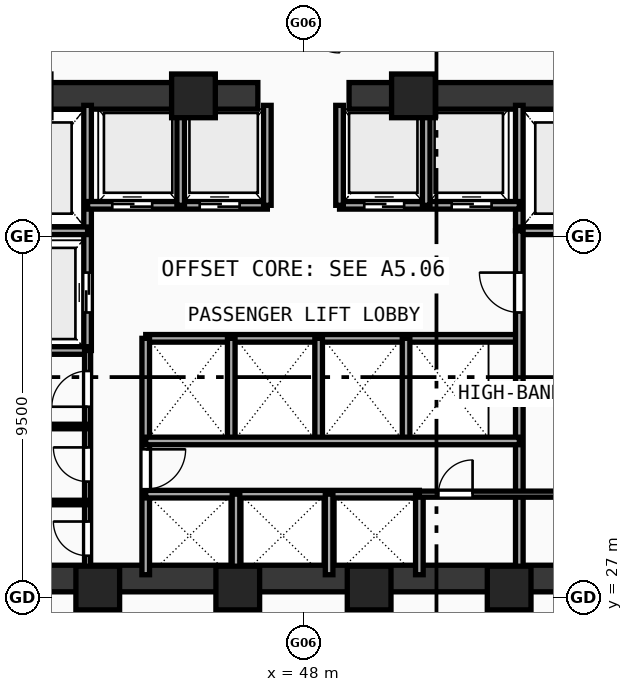
"""IFC4 building model, lengths in metres.
Left out: names, types, materials, properties, quantities, classifications, styles, units other than length and angle.
Written with IfcOpenShell. Run it as: python <this file> out.ifc"""

import sys

from ifc_helpers import new_model, si_unit, direction, frame, frame_2d, origin, origin_with_axes, origin_2d, place, context, subcontext, project, spatial, rectangle, hollow_rectangle, extrude, source, transform, mapped, element, fill, save


model = new_model("IFC4")
c1 = context("Model", 3, precision=1e-05, world=origin(), true_north=direction((0.0, 1.0)))
c2 = subcontext(c1, "Body", "Model", "MODEL_VIEW")
j1 = project(units=[si_unit("LENGTHUNIT", "METRE"), si_unit("PLANEANGLEUNIT", "RADIAN")], contexts=[c1])
p1 = place(None, origin())
s1 = spatial("IfcSite", under=j1, at=p1, CompositionType="ELEMENT")
p2 = place(p1, origin())
s2 = spatial("IfcBuilding", under=s1, at=p2, CompositionType="ELEMENT")
p3 = place(p2, frame((0.0, 0.0, 55.81)))
s3 = spatial("IfcBuildingStorey", under=s2, at=p3, CompositionType="ELEMENT", Elevation=55.81)
p4 = place(p3, frame((35.45, 27.5, 0.0), z_axis=(0.0, 0.0, 1.0), x_axis=(1.0, 0.0, 0.0)))
e1 = element("IfcWall", 1, at=p4, inside=s3, PredefinedType="SHEAR", context=c2, shape_type="SweptSolid", body=[
    extrude(rectangle(XDim=25.1, YDim=0.7, at=frame_2d((12.55, 0.0))), origin(), (0.0, 0.0, 1.0), 3.37),
])
p5 = place(p3, frame((35.45, 40.2, 0.0), z_axis=(0.0, 0.0, 1.0), x_axis=(1.0, 0.0, 0.0)))
e2 = element("IfcWall", 2, at=p5, inside=s3, PredefinedType="SHEAR", context=c2, shape_type="SweptSolid", body=[
    extrude(rectangle(XDim=11.35, YDim=0.7, at=frame_2d((5.675, 0.0))), origin(), (0.0, 0.0, 1.0), 3.37),
])
p6 = place(p5, frame((1.7, 0.0, 0.0)))
e3 = element("IfcOpeningElement", 3, at=p6, cuts=e2, PredefinedType="OPENING", context=c2, shape_type="SweptSolid", body=[
    extrude(rectangle(XDim=1.05, YDim=2.1, at=frame_2d((0.525, 1.05))), frame((0.0, 0.36, 0.0), z_axis=(0.0, -1.0, 0.0), x_axis=(1.0, 0.0, 0.0)), (0.0, 0.0, 1.0), 0.72),
])
p7 = place(p3, frame((49.2, 40.2, 0.0), z_axis=(0.0, 0.0, 1.0), x_axis=(1.0, 0.0, 0.0)))
e4 = element("IfcWall", 4, at=p7, inside=s3, PredefinedType="SHEAR", context=c2, shape_type="SweptSolid", body=[
    extrude(rectangle(XDim=11.35, YDim=0.7, at=frame_2d((5.675, 0.0))), origin(), (0.0, 0.0, 1.0), 3.37),
])
p8 = place(p7, frame((8.6, 0.0, 0.0)))
e5 = element("IfcOpeningElement", 5, at=p8, cuts=e4, PredefinedType="OPENING", context=c2, shape_type="SweptSolid", body=[
    extrude(rectangle(XDim=1.05, YDim=2.1, at=frame_2d((0.525, 1.05))), frame((0.0, 0.36, 0.0), z_axis=(0.0, -1.0, 0.0), x_axis=(1.0, 0.0, 0.0)), (0.0, 0.0, 1.0), 0.72),
])
m1 = source(origin(), c2, "Body", "SweptSolid", [
    extrude(hollow_rectangle(XDim=1.15, YDim=1.15, WallThickness=0.048, at=origin_2d()), origin(), (0.0, 0.0, 1.0), 3.63),
])
for number, where, z_axis, x_axis in (
    (6, (42.588, 27.25, -0.26), (0.0, 0.0, 1.0), (1.0, 0.0, 0.0)),
    (7, (46.272, 27.25, -0.26), (0.0, 0.0, 1.0), (1.0, 0.0, 0.0)),
    (8, (49.729, 27.25, -0.26), (0.0, 0.0, 1.0), (1.0, 0.0, 0.0)),
    (9, (53.412, 27.25, -0.26), (0.0, 0.0, 1.0), (1.0, 0.0, 0.0)),
    (10, (50.894, 40.2, -0.26), (0.0, 0.0, 1.0), (1.0, 0.0, 0.0)),
    (11, (45.106, 40.2, -0.26), (0.0, 0.0, 1.0), (1.0, 0.0, 0.0)),
):
    element("IfcColumn", number, at=place(p3, frame(where, z_axis=z_axis, x_axis=x_axis)), inside=s3, PredefinedType="COLUMN", context=c2, shape_type="MappedRepresentation", body=[
        mapped(m1, transform((0.0, 0.0, 0.0), scale=1.0)),
    ])
p9 = place(p3, frame((42.32, 33.5, 0.0), z_axis=(0.0, 0.0, 1.0), x_axis=(0.0, 1.0, 0.0)))
e12 = element("IfcWall", 12, at=p9, inside=s3, PredefinedType="SOLIDWALL", context=c2, shape_type="SweptSolid", body=[
    extrude(rectangle(XDim=6.45, YDim=0.2, at=frame_2d((3.225, 0.0))), origin(), (0.0, 0.0, 1.0), 3.37),
])
p10 = place(p9, frame((1.0, 0.0, 0.0)))
e13 = element("IfcOpeningElement", 13, at=p10, cuts=e12, PredefinedType="OPENING", context=c2, shape_type="SweptSolid", body=[
    extrude(rectangle(XDim=1.05, YDim=2.1, at=frame_2d((0.525, 1.05))), frame((0.0, 0.11, 0.0), z_axis=(0.0, -1.0, 0.0), x_axis=(1.0, 0.0, 0.0)), (0.0, 0.0, 1.0), 0.22),
])
for number, where, z_axis, x_axis in (
    (14, (39.6, 36.65, 0.0), (0.0, 0.0, 1.0), (1.0, 0.0, 0.0)),
    (15, (39.6, 33.5, 0.0), (0.0, 0.0, 1.0), (1.0, 0.0, 0.0)),
):
    element("IfcWall", number, at=place(p3, frame(where, z_axis=z_axis, x_axis=x_axis)), inside=s3, PredefinedType="SOLIDWALL", context=c2, shape_type="SweptSolid", body=[
        extrude(rectangle(XDim=2.72, YDim=0.2, at=frame_2d((1.36, 0.0))), origin(), (0.0, 0.0, 1.0), 3.37),
    ])
p11 = place(p3, frame((53.68, 36.65, 0.0), z_axis=(0.0, 0.0, 1.0), x_axis=(0.0, 1.0, 0.0)))
e16 = element("IfcWall", 16, at=p11, inside=s3, PredefinedType="SOLIDWALL", context=c2, shape_type="SweptSolid", body=[
    extrude(rectangle(XDim=3.3, YDim=0.2, at=frame_2d((1.65, 0.0))), origin(), (0.0, 0.0, 1.0), 3.37),
])
p12 = place(p3, frame((53.68, 36.65, 0.0), z_axis=(0.0, 0.0, 1.0), x_axis=(1.0, 0.0, 0.0)))
e17 = element("IfcWall", 17, at=p12, inside=s3, PredefinedType="SOLIDWALL", context=c2, shape_type="SweptSolid", body=[
    extrude(rectangle(XDim=2.72, YDim=0.2, at=frame_2d((1.36, 0.0))), origin(), (0.0, 0.0, 1.0), 3.37),
])
p13 = place(p3, frame((42.32, 37.32, 0.0), z_axis=(0.0, 0.0, 1.0), x_axis=(1.0, 0.0, 0.0)))
e18 = element("IfcWall", 18, at=p13, inside=s3, PredefinedType="SOLIDWALL", context=c2, shape_type="SweptSolid", body=[
    extrude(rectangle(XDim=4.73, YDim=0.2, at=frame_2d((2.365, 0.0))), origin(), (0.0, 0.0, 1.0), 3.37),
])
p14 = place(p13, frame((0.65, 0.0, 0.0)))
e19 = element("IfcOpeningElement", 19, at=p14, cuts=e18, PredefinedType="OPENING", context=c2, shape_type="SweptSolid", body=[
    extrude(rectangle(XDim=1.05, YDim=2.1, at=frame_2d((0.525, 1.05))), frame((0.0, 0.11, 0.0), z_axis=(0.0, -1.0, 0.0), x_axis=(1.0, 0.0, 0.0)), (0.0, 0.0, 1.0), 0.22),
])
p15 = place(p13, frame((2.95, 0.0, 0.0)))
e20 = element("IfcOpeningElement", 20, at=p15, cuts=e18, PredefinedType="OPENING", context=c2, shape_type="SweptSolid", body=[
    extrude(rectangle(XDim=1.05, YDim=2.1, at=frame_2d((0.525, 1.05))), frame((0.0, 0.11, 0.0), z_axis=(0.0, -1.0, 0.0), x_axis=(1.0, 0.0, 0.0)), (0.0, 0.0, 1.0), 0.22),
])
p16 = place(p3, frame((48.95, 37.32, 0.0), z_axis=(0.0, 0.0, 1.0), x_axis=(1.0, 0.0, 0.0)))
e21 = element("IfcWall", 21, at=p16, inside=s3, PredefinedType="SOLIDWALL", context=c2, shape_type="SweptSolid", body=[
    extrude(rectangle(XDim=4.73, YDim=0.2, at=frame_2d((2.365, 0.0))), origin(), (0.0, 0.0, 1.0), 3.37),
])
p17 = place(p16, frame((0.65, 0.0, 0.0)))
e22 = element("IfcOpeningElement", 22, at=p17, cuts=e21, PredefinedType="OPENING", context=c2, shape_type="SweptSolid", body=[
    extrude(rectangle(XDim=1.05, YDim=2.1, at=frame_2d((0.525, 1.05))), frame((0.0, 0.11, 0.0), z_axis=(0.0, -1.0, 0.0), x_axis=(1.0, 0.0, 0.0)), (0.0, 0.0, 1.0), 0.22),
])
p18 = place(p16, frame((2.95, 0.0, 0.0)))
e23 = element("IfcOpeningElement", 23, at=p18, cuts=e21, PredefinedType="OPENING", context=c2, shape_type="SweptSolid", body=[
    extrude(rectangle(XDim=1.05, YDim=2.1, at=frame_2d((0.525, 1.05))), frame((0.0, 0.11, 0.0), z_axis=(0.0, -1.0, 0.0), x_axis=(1.0, 0.0, 0.0)), (0.0, 0.0, 1.0), 0.22),
])
for number, where, z_axis, x_axis in (
    (24, (47.05, 37.32, 0.0), (0.0, 0.0, 1.0), (0.0, 1.0, 0.0)),
    (25, (48.95, 37.32, 0.0), (0.0, 0.0, 1.0), (0.0, 1.0, 0.0)),
    (26, (44.77, 37.32, 0.0), (0.0, 0.0, 1.0), (0.0, 1.0, 0.0)),
    (27, (51.23, 37.32, 0.0), (0.0, 0.0, 1.0), (0.0, 1.0, 0.0)),
):
    element("IfcWall", number, at=place(p3, frame(where, z_axis=z_axis, x_axis=x_axis)), inside=s3, PredefinedType="SOLIDWALL", context=c2, shape_type="SweptSolid", body=[
        extrude(rectangle(XDim=2.63, YDim=0.2, at=frame_2d((1.315, 0.0))), origin(), (0.0, 0.0, 1.0), 3.37),
    ])
p19 = place(p3, frame((43.85, 33.82, 0.0), z_axis=(0.0, 0.0, 1.0), x_axis=(1.0, 0.0, 0.0)))
e28 = element("IfcWall", 28, at=p19, inside=s3, PredefinedType="SOLIDWALL", context=c2, shape_type="SweptSolid", body=[
    extrude(rectangle(XDim=9.83, YDim=0.2, at=frame_2d((4.915, 0.0))), origin(), (0.0, 0.0, 1.0), 3.37),
])
p20 = place(p3, frame((43.85, 27.6, 0.0), z_axis=(0.0, 0.0, 1.0), x_axis=(0.0, 1.0, 0.0)))
e29 = element("IfcWall", 29, at=p20, inside=s3, PredefinedType="SOLIDWALL", context=c2, shape_type="SweptSolid", body=[
    extrude(rectangle(XDim=6.22, YDim=0.2, at=frame_2d((3.11, 0.0))), origin(), (0.0, 0.0, 1.0), 3.37),
])
p21 = place(p20, frame((2.25, 0.0, 0.0)))
e30 = element("IfcOpeningElement", 30, at=p21, cuts=e29, PredefinedType="OPENING", context=c2, shape_type="SweptSolid", body=[
    extrude(rectangle(XDim=1.05, YDim=2.1, at=frame_2d((0.525, 1.05))), frame((0.0, 0.11, 0.0), z_axis=(0.0, -1.0, 0.0), x_axis=(1.0, 0.0, 0.0)), (0.0, 0.0, 1.0), 0.22),
])
p22 = place(p3, frame((53.68, 27.6, 0.0), z_axis=(0.0, 0.0, 1.0), x_axis=(0.0, 1.0, 0.0)))
e31 = element("IfcWall", 31, at=p22, inside=s3, PredefinedType="SOLIDWALL", context=c2, shape_type="SweptSolid", body=[
    extrude(rectangle(XDim=9.05, YDim=0.2, at=frame_2d((4.525, 0.0))), origin(), (0.0, 0.0, 1.0), 3.37),
])
p23 = place(p22, frame((6.9, 0.0, 0.0)))
e32 = element("IfcOpeningElement", 32, at=p23, cuts=e31, PredefinedType="OPENING", context=c2, shape_type="SweptSolid", body=[
    extrude(rectangle(XDim=1.05, YDim=2.1, at=frame_2d((0.525, 1.05))), frame((0.0, 0.11, 0.0), z_axis=(0.0, -1.0, 0.0), x_axis=(1.0, 0.0, 0.0)), (0.0, 0.0, 1.0), 0.22),
])
for number, where, z_axis, x_axis in (
    (33, (46.1, 31.12, 0.0), (0.0, 0.0, 1.0), (0.0, 1.0, 0.0)),
    (34, (48.4, 31.12, 0.0), (0.0, 0.0, 1.0), (0.0, 1.0, 0.0)),
    (35, (50.7, 31.12, 0.0), (0.0, 0.0, 1.0), (0.0, 1.0, 0.0)),
):
    element("IfcWall", number, at=place(p3, frame(where, z_axis=z_axis, x_axis=x_axis)), inside=s3, PredefinedType="SOLIDWALL", context=c2, shape_type="SweptSolid", body=[
        extrude(rectangle(XDim=2.7, YDim=0.2, at=frame_2d((1.35, 0.0))), origin(), (0.0, 0.0, 1.0), 3.37),
    ])
p24 = place(p3, frame((43.85, 29.72, 0.0), z_axis=(0.0, 0.0, 1.0), x_axis=(1.0, 0.0, 0.0)))
e36 = element("IfcWall", 36, at=p24, inside=s3, PredefinedType="SOLIDWALL", context=c2, shape_type="SweptSolid", body=[
    extrude(rectangle(XDim=7.2, YDim=0.2, at=frame_2d((3.6, 0.0))), origin(), (0.0, 0.0, 1.0), 3.37),
])
p25 = place(p3, frame((51.05, 27.6, 0.0), z_axis=(0.0, 0.0, 1.0), x_axis=(0.0, 1.0, 0.0)))
e37 = element("IfcWall", 37, at=p25, inside=s3, PredefinedType="SOLIDWALL", context=c2, shape_type="SweptSolid", body=[
    extrude(rectangle(XDim=2.12, YDim=0.2, at=frame_2d((1.06, 0.0))), origin(), (0.0, 0.0, 1.0), 3.37),
])
p26 = place(p3, frame((43.85, 31.12, 0.0), z_axis=(0.0, 0.0, 1.0), x_axis=(1.0, 0.0, 0.0)))
e38 = element("IfcWall", 38, at=p26, inside=s3, PredefinedType="SOLIDWALL", context=c2, shape_type="SweptSolid", body=[
    extrude(rectangle(XDim=9.83, YDim=0.2, at=frame_2d((4.915, 0.0))), origin(), (0.0, 0.0, 1.0), 3.37),
])
for number, where, z_axis, x_axis in (
    (39, (46.225, 27.6, 0.0), (0.0, 0.0, 1.0), (0.0, 1.0, 0.0)),
    (40, (48.675, 27.6, 0.0), (0.0, 0.0, 1.0), (0.0, 1.0, 0.0)),
):
    element("IfcWall", number, at=place(p3, frame(where, z_axis=z_axis, x_axis=x_axis)), inside=s3, PredefinedType="SOLIDWALL", context=c2, shape_type="SweptSolid", body=[
        extrude(rectangle(XDim=2.12, YDim=0.2, at=frame_2d((1.06, 0.0))), origin(), (0.0, 0.0, 1.0), 3.37),
    ])
p27 = place(p3, frame((42.32, 27.6, 0.0), z_axis=(0.0, 0.0, 1.0), x_axis=(0.0, 1.0, 0.0)))
e41 = element("IfcWall", 41, at=p27, inside=s3, PredefinedType="PARTITIONING", context=c2, shape_type="SweptSolid", body=[
    extrude(rectangle(XDim=5.9, YDim=0.16, at=frame_2d((2.95, 0.0))), origin(), (0.0, 0.0, 1.0), 3.37),
])
p28 = place(p27, frame((0.5, 0.0, 0.0)))
e42 = element("IfcOpeningElement", 42, at=p28, cuts=e41, PredefinedType="OPENING", context=c2, shape_type="SweptSolid", body=[
    extrude(rectangle(XDim=0.9, YDim=2.1, at=frame_2d((0.45, 1.05))), frame((0.0, 0.09, 0.0), z_axis=(0.0, -1.0, 0.0), x_axis=(1.0, 0.0, 0.0)), (0.0, 0.0, 1.0), 0.18),
])
p29 = place(p27, frame((2.45, 0.0, 0.0)))
e43 = element("IfcOpeningElement", 43, at=p29, cuts=e41, PredefinedType="OPENING", context=c2, shape_type="SweptSolid", body=[
    extrude(rectangle(XDim=0.9, YDim=2.1, at=frame_2d((0.45, 1.05))), frame((0.0, 0.09, 0.0), z_axis=(0.0, -1.0, 0.0), x_axis=(1.0, 0.0, 0.0)), (0.0, 0.0, 1.0), 0.18),
])
p30 = place(p27, frame((4.42, 0.0, 0.0)))
e44 = element("IfcOpeningElement", 44, at=p30, cuts=e41, PredefinedType="OPENING", context=c2, shape_type="SweptSolid", body=[
    extrude(rectangle(XDim=0.94, YDim=2.1, at=frame_2d((0.47, 1.05))), frame((0.0, 0.09, 0.0), z_axis=(0.0, -1.0, 0.0), x_axis=(1.0, 0.0, 0.0)), (0.0, 0.0, 1.0), 0.18),
])
p31 = place(p3, frame((51.05, 29.72, 0.0), z_axis=(0.0, 0.0, 1.0), x_axis=(1.0, 0.0, 0.0)))
e45 = element("IfcWall", 45, at=p31, inside=s3, PredefinedType="PARTITIONING", context=c2, shape_type="SweptSolid", body=[
    extrude(rectangle(XDim=4.07, YDim=0.16, at=frame_2d((2.035, 0.0))), origin(), (0.0, 0.0, 1.0), 3.37),
])
p32 = place(p31, frame((0.5, 0.0, 0.0)))
e46 = element("IfcOpeningElement", 46, at=p32, cuts=e45, PredefinedType="OPENING", context=c2, shape_type="SweptSolid", body=[
    extrude(rectangle(XDim=0.9, YDim=2.1, at=frame_2d((0.45, 1.05))), frame((0.0, 0.09, 0.0), z_axis=(0.0, -1.0, 0.0), x_axis=(1.0, 0.0, 0.0)), (0.0, 0.0, 1.0), 0.18),
])
for number, where, z_axis, x_axis in (
    (47, (39.6, 29.5, 0.0), (0.0, 0.0, 1.0), (1.0, 0.0, 0.0)),
    (48, (39.6, 31.5, 0.0), (0.0, 0.0, 1.0), (1.0, 0.0, 0.0)),
):
    element("IfcWall", number, at=place(p3, frame(where, z_axis=z_axis, x_axis=x_axis)), inside=s3, PredefinedType="PARTITIONING", context=c2, shape_type="SweptSolid", body=[
        extrude(rectangle(XDim=2.72, YDim=0.12, at=frame_2d((1.36, 0.0))), origin(), (0.0, 0.0, 1.0), 3.37),
    ])
m2 = source(origin(), c2, "Body", "SweptSolid", [
    extrude(rectangle(XDim=1.05, YDim=2.1, at=frame_2d((0.525, 1.05))), frame((0.0, 0.025, 0.0), z_axis=(0.0, -1.0, 0.0), x_axis=(1.0, 0.0, 0.0)), (0.0, 0.0, 1.0), 0.05),
])
p33 = place(p10, origin_with_axes())
e49 = element("IfcDoor", 49, at=p33, inside=s3, OperationType="DOUBLE_DOOR_SLIDING", PredefinedType="DOOR", context=c2, shape_type="MappedRepresentation", body=[
    mapped(m2, transform((0.0, 0.0, 0.0), scale=1.0)),
])
fill(e13, e49)
p34 = place(p14, frame((1.05, 0.0, 0.0), z_axis=(0.0, 0.0, 1.0), x_axis=(-1.0, 0.0, 0.0)))
e50 = element("IfcDoor", 50, at=p34, inside=s3, OperationType="DOUBLE_DOOR_SLIDING", PredefinedType="DOOR", context=c2, shape_type="MappedRepresentation", body=[
    mapped(m2, transform((0.0, 0.0, 0.0), scale=1.0)),
])
fill(e19, e50)
p35 = place(p15, frame((1.05, 0.0, 0.0), z_axis=(0.0, 0.0, 1.0), x_axis=(-1.0, 0.0, 0.0)))
e51 = element("IfcDoor", 51, at=p35, inside=s3, OperationType="DOUBLE_DOOR_SLIDING", PredefinedType="DOOR", context=c2, shape_type="MappedRepresentation", body=[
    mapped(m2, transform((0.0, 0.0, 0.0), scale=1.0)),
])
fill(e20, e51)
p36 = place(p17, frame((1.05, 0.0, 0.0), z_axis=(0.0, 0.0, 1.0), x_axis=(-1.0, 0.0, 0.0)))
e52 = element("IfcDoor", 52, at=p36, inside=s3, OperationType="DOUBLE_DOOR_SLIDING", PredefinedType="DOOR", context=c2, shape_type="MappedRepresentation", body=[
    mapped(m2, transform((0.0, 0.0, 0.0), scale=1.0)),
])
fill(e22, e52)
p37 = place(p18, frame((1.05, 0.0, 0.0), z_axis=(0.0, 0.0, 1.0), x_axis=(-1.0, 0.0, 0.0)))
e53 = element("IfcDoor", 53, at=p37, inside=s3, OperationType="DOUBLE_DOOR_SLIDING", PredefinedType="DOOR", context=c2, shape_type="MappedRepresentation", body=[
    mapped(m2, transform((0.0, 0.0, 0.0), scale=1.0)),
])
fill(e23, e53)
p38 = place(p21, frame((1.05, 0.0, 0.0), z_axis=(0.0, 0.0, 1.0), x_axis=(-1.0, 0.0, 0.0)))
e54 = element("IfcDoor", 54, at=p38, inside=s3, OperationType="SINGLE_SWING_LEFT", PredefinedType="DOOR", context=c2, shape_type="MappedRepresentation", body=[
    mapped(m2, transform((0.0, 0.0, 0.0), scale=1.0)),
])
fill(e30, e54)
p39 = place(p23, origin_with_axes())
e55 = element("IfcDoor", 55, at=p39, inside=s3, OperationType="SINGLE_SWING_RIGHT", PredefinedType="DOOR", context=c2, shape_type="MappedRepresentation", body=[
    mapped(m2, transform((0.0, 0.0, 0.0), scale=1.0)),
])
fill(e32, e55)
m3 = source(origin(), c2, "Body", "SweptSolid", [
    extrude(rectangle(XDim=0.9, YDim=2.1, at=frame_2d((0.45, 1.05))), frame((0.0, 0.025, 0.0), z_axis=(0.0, -1.0, 0.0), x_axis=(1.0, 0.0, 0.0)), (0.0, 0.0, 1.0), 0.05),
])
p40 = place(p28, origin_with_axes())
e56 = element("IfcDoor", 56, at=p40, inside=s3, OperationType="SINGLE_SWING_RIGHT", PredefinedType="DOOR", context=c2, shape_type="MappedRepresentation", body=[
    mapped(m3, transform((0.0, 0.0, 0.0), scale=1.0)),
])
fill(e42, e56)
p41 = place(p29, origin_with_axes())
e57 = element("IfcDoor", 57, at=p41, inside=s3, OperationType="SINGLE_SWING_RIGHT", PredefinedType="DOOR", context=c2, shape_type="MappedRepresentation", body=[
    mapped(m3, transform((0.0, 0.0, 0.0), scale=1.0)),
])
fill(e43, e57)
m4 = source(origin(), c2, "Body", "SweptSolid", [
    extrude(rectangle(XDim=0.94, YDim=2.1, at=frame_2d((0.47, 1.05))), frame((0.0, 0.025, 0.0), z_axis=(0.0, -1.0, 0.0), x_axis=(1.0, 0.0, 0.0)), (0.0, 0.0, 1.0), 0.05),
])
p42 = place(p30, origin_with_axes())
e58 = element("IfcDoor", 58, at=p42, inside=s3, OperationType="SINGLE_SWING_LEFT", PredefinedType="DOOR", context=c2, shape_type="MappedRepresentation", body=[
    mapped(m4, transform((0.0, 0.0, 0.0), scale=1.0)),
])
fill(e44, e58)
p43 = place(p32, origin_with_axes())
e59 = element("IfcDoor", 59, at=p43, inside=s3, OperationType="SINGLE_SWING_RIGHT", PredefinedType="DOOR", context=c2, shape_type="MappedRepresentation", body=[
    mapped(m3, transform((0.0, 0.0, 0.0), scale=1.0)),
])
fill(e46, e59)
save(model, sys.argv[1])
